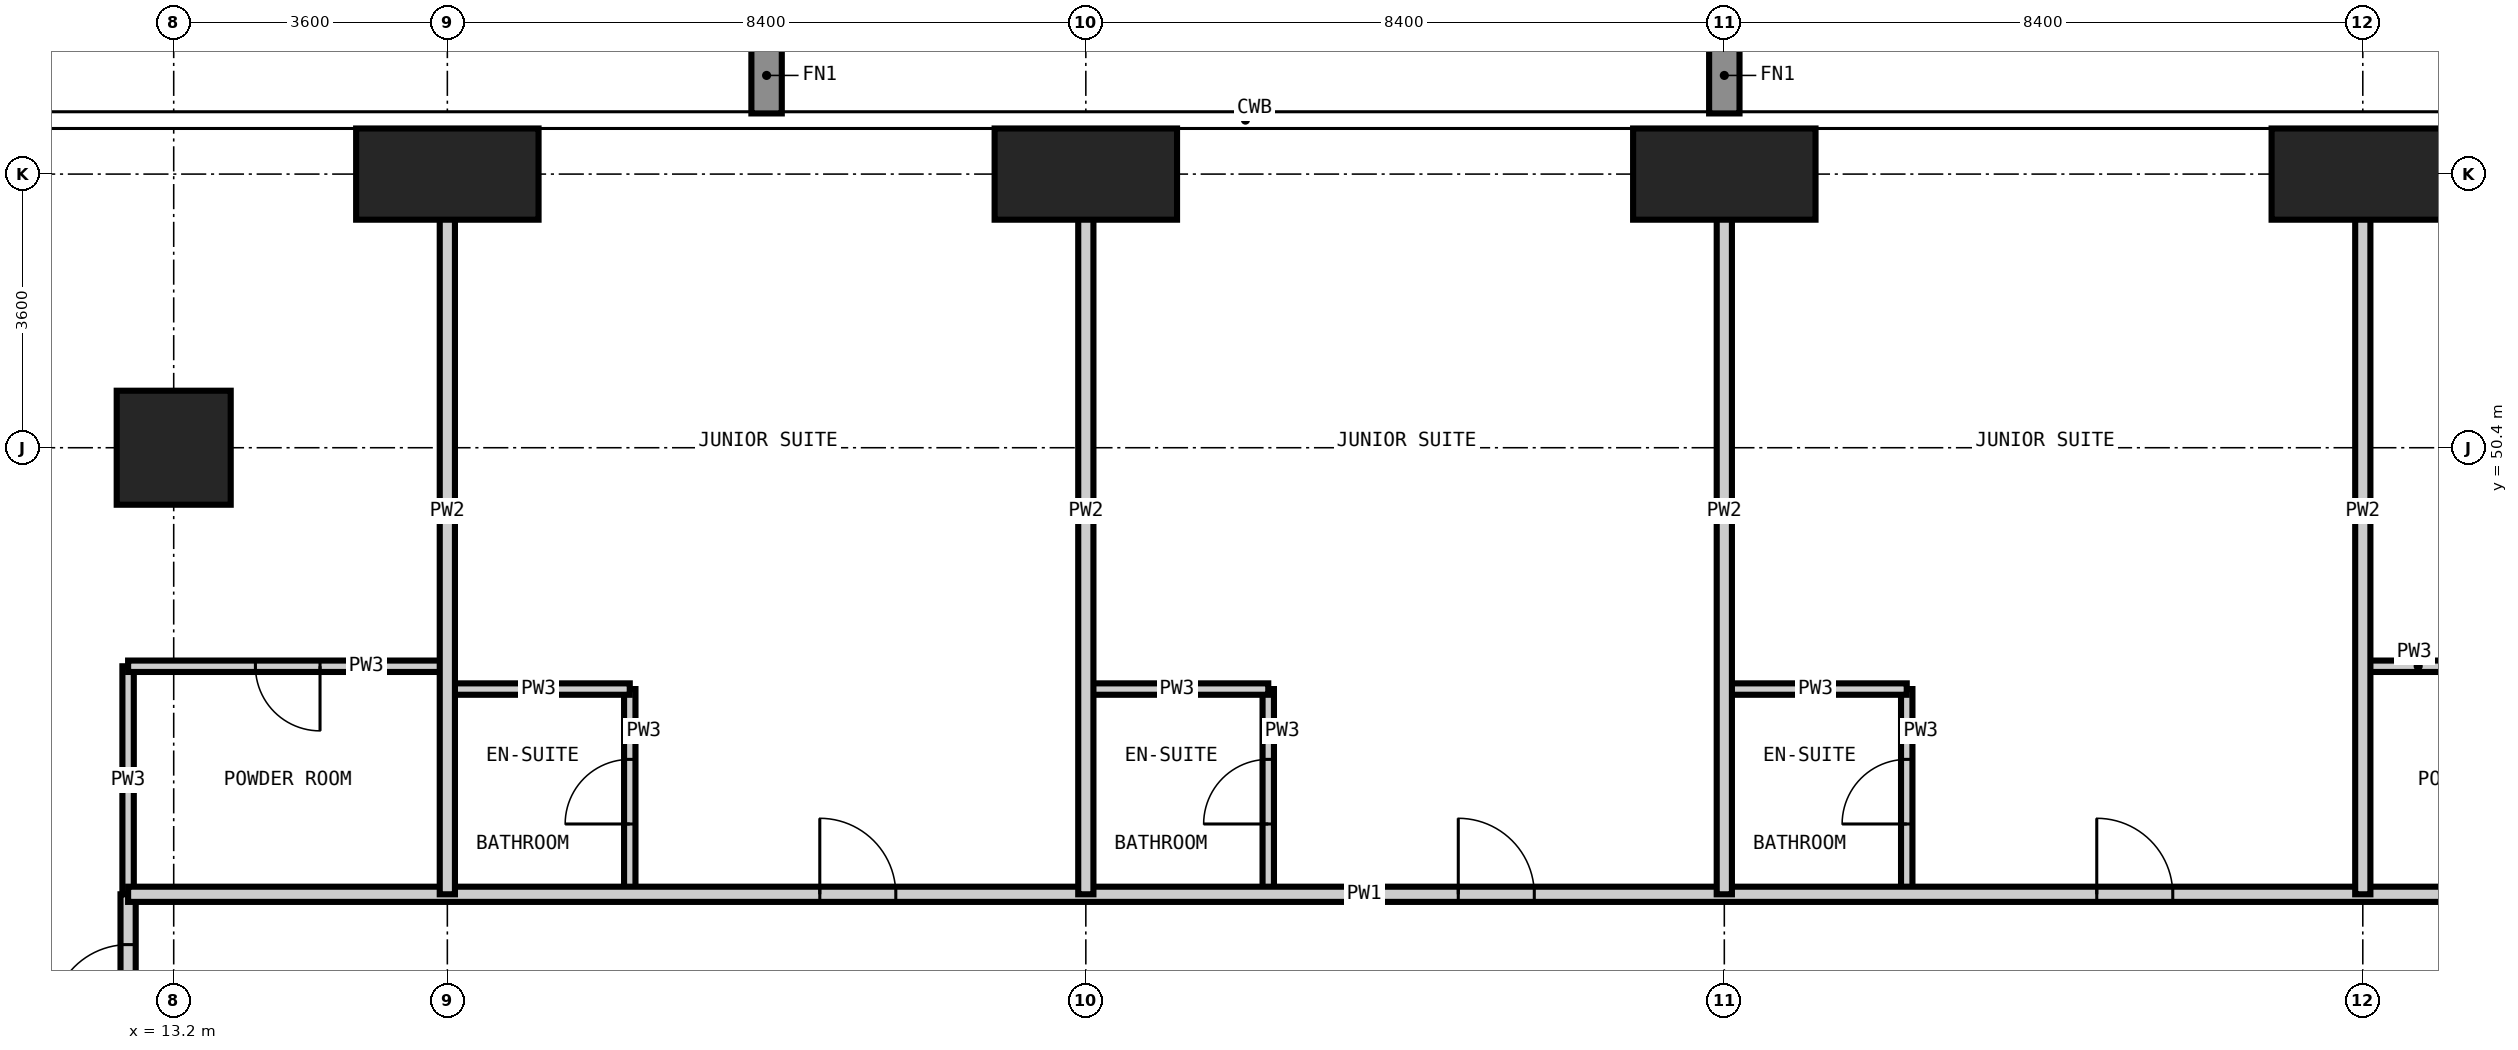
"""IFC4 building model, lengths in metres.
Left out: names, types, materials, properties, quantities, classifications, styles, units other than length and angle.
Written with IfcOpenShell. Run it as: python <this file> out.ifc"""

import sys

from ifc_helpers import new_model, si_unit, direction, frame, frame_2d, origin, origin_2d, place, context, subcontext, project, spatial, rectangle, extrude, element, fill, save


model = new_model("IFC4")
c1 = context("Model", 3, precision=1e-05, world=origin(), true_north=direction((0.0, 1.0)))
c2 = subcontext(c1, "Body", "Model", "MODEL_VIEW")
j1 = project(units=[si_unit("LENGTHUNIT", "METRE"), si_unit("PLANEANGLEUNIT", "RADIAN")], contexts=[c1])
p1 = place(None, origin())
s1 = spatial("IfcSite", under=j1, at=p1, CompositionType="ELEMENT")
p2 = place(p1, origin())
s2 = spatial("IfcBuilding", under=s1, at=p2, CompositionType="ELEMENT")
p3 = place(p2, frame((0.0, 0.0, 118.8)))
s3 = spatial("IfcBuildingStorey", under=s2, at=p3, CompositionType="ELEMENT", Elevation=118.8)
p4 = place(p3, frame((13.2, 50.4, -0.35), z_axis=(0.0, 0.0, 1.0), x_axis=(1.0, 0.0, 0.0)))
e1 = element("IfcColumn", 1, at=p4, inside=s3, PredefinedType="COLUMN", context=c2, shape_type="SweptSolid", body=[
    extrude(rectangle(XDim=1.5, YDim=1.5, at=origin_2d()), origin(), (0.0, 0.0, 1.0), 3.6),
])
for number, where, z_axis, x_axis in (
    (2, (16.8, 54.0, -0.35), (0.0, 0.0, 1.0), (1.0, 0.0, 0.0)),
    (3, (25.2, 54.0, -0.35), (0.0, 0.0, 1.0), (1.0, 0.0, 0.0)),
    (4, (33.6, 54.0, -0.35), (0.0, 0.0, 1.0), (1.0, 0.0, 0.0)),
    (5, (42.0, 54.0, -0.35), (0.0, 0.0, 1.0), (1.0, 0.0, 0.0)),
):
    element("IfcColumn", number, at=place(p3, frame(where, z_axis=z_axis, x_axis=x_axis)), inside=s3, PredefinedType="COLUMN", context=c2, shape_type="SweptSolid", body=[
        extrude(rectangle(XDim=2.4, YDim=1.2, at=origin_2d()), origin(), (0.0, 0.0, 1.0), 3.6),
    ])
p5 = place(p3, frame((12.6, 44.525, 0.0), z_axis=(0.0, 0.0, 1.0), x_axis=(0.0, 1.0, 0.0)))
e6 = element("IfcWall", 6, at=p5, inside=s3, PredefinedType="PARTITIONING", context=c2, shape_type="SweptSolid", body=[
    extrude(rectangle(XDim=3.0, YDim=0.15, at=frame_2d((1.5, 0.0))), origin(), (0.0, 0.0, 1.0), 3.25),
])
p6 = place(p3, frame((19.2, 44.525, 0.0), z_axis=(0.0, 0.0, 1.0), x_axis=(0.0, 1.0, 0.0)))
e7 = element("IfcWall", 7, at=p6, inside=s3, PredefinedType="PARTITIONING", context=c2, shape_type="SweptSolid", body=[
    extrude(rectangle(XDim=2.7, YDim=0.15, at=frame_2d((1.35, 0.0))), origin(), (0.0, 0.0, 1.0), 3.25),
])
p7 = place(p6, frame((0.925, 0.0, 0.0)))
e8 = element("IfcOpeningElement", 8, at=p7, cuts=e7, PredefinedType="OPENING", context=c2, shape_type="SweptSolid", body=[
    extrude(rectangle(XDim=0.85, YDim=2.1, at=frame_2d((0.425, 1.05))), frame((0.0, 0.085, 0.0), z_axis=(0.0, -1.0, 0.0), x_axis=(1.0, 0.0, 0.0)), (0.0, 0.0, 1.0), 0.17),
])
p8 = place(p3, frame((27.6, 44.525, 0.0), z_axis=(0.0, 0.0, 1.0), x_axis=(0.0, 1.0, 0.0)))
e9 = element("IfcWall", 9, at=p8, inside=s3, PredefinedType="PARTITIONING", context=c2, shape_type="SweptSolid", body=[
    extrude(rectangle(XDim=2.7, YDim=0.15, at=frame_2d((1.35, 0.0))), origin(), (0.0, 0.0, 1.0), 3.25),
])
p9 = place(p8, frame((0.925, 0.0, 0.0)))
e10 = element("IfcOpeningElement", 10, at=p9, cuts=e9, PredefinedType="OPENING", context=c2, shape_type="SweptSolid", body=[
    extrude(rectangle(XDim=0.85, YDim=2.1, at=frame_2d((0.425, 1.05))), frame((0.0, 0.085, 0.0), z_axis=(0.0, -1.0, 0.0), x_axis=(1.0, 0.0, 0.0)), (0.0, 0.0, 1.0), 0.17),
])
p10 = place(p3, frame((36.0, 44.525, 0.0), z_axis=(0.0, 0.0, 1.0), x_axis=(0.0, 1.0, 0.0)))
e11 = element("IfcWall", 11, at=p10, inside=s3, PredefinedType="PARTITIONING", context=c2, shape_type="SweptSolid", body=[
    extrude(rectangle(XDim=2.7, YDim=0.15, at=frame_2d((1.35, 0.0))), origin(), (0.0, 0.0, 1.0), 3.25),
])
p11 = place(p10, frame((0.925, 0.0, 0.0)))
e12 = element("IfcOpeningElement", 12, at=p11, cuts=e11, PredefinedType="OPENING", context=c2, shape_type="SweptSolid", body=[
    extrude(rectangle(XDim=0.85, YDim=2.1, at=frame_2d((0.425, 1.05))), frame((0.0, 0.085, 0.0), z_axis=(0.0, -1.0, 0.0), x_axis=(1.0, 0.0, 0.0)), (0.0, 0.0, 1.0), 0.17),
])
p12 = place(p3, frame((16.8, 47.225, 0.0), z_axis=(0.0, 0.0, 1.0), x_axis=(1.0, 0.0, 0.0)))
e13 = element("IfcWall", 13, at=p12, inside=s3, PredefinedType="PARTITIONING", context=c2, shape_type="SweptSolid", body=[
    extrude(rectangle(XDim=2.4, YDim=0.15, at=frame_2d((1.2, 0.0))), origin(), (0.0, 0.0, 1.0), 3.25),
])
p13 = place(p3, frame((25.2, 47.225, 0.0), z_axis=(0.0, 0.0, 1.0), x_axis=(1.0, 0.0, 0.0)))
e14 = element("IfcWall", 14, at=p13, inside=s3, PredefinedType="PARTITIONING", context=c2, shape_type="SweptSolid", body=[
    extrude(rectangle(XDim=2.4, YDim=0.15, at=frame_2d((1.2, 0.0))), origin(), (0.0, 0.0, 1.0), 3.25),
])
p14 = place(p3, frame((33.6, 47.225, 0.0), z_axis=(0.0, 0.0, 1.0), x_axis=(1.0, 0.0, 0.0)))
e15 = element("IfcWall", 15, at=p14, inside=s3, PredefinedType="PARTITIONING", context=c2, shape_type="SweptSolid", body=[
    extrude(rectangle(XDim=2.4, YDim=0.15, at=frame_2d((1.2, 0.0))), origin(), (0.0, 0.0, 1.0), 3.25),
])
p15 = place(p3, frame((12.6, 47.525, 0.0), z_axis=(0.0, 0.0, 1.0), x_axis=(1.0, 0.0, 0.0)))
e16 = element("IfcWall", 16, at=p15, inside=s3, PredefinedType="PARTITIONING", context=c2, shape_type="SweptSolid", body=[
    extrude(rectangle(XDim=4.2, YDim=0.15, at=frame_2d((2.1, 0.0))), origin(), (0.0, 0.0, 1.0), 3.25),
])
p16 = place(p15, frame((1.675, 0.0, 0.0)))
e17 = element("IfcOpeningElement", 17, at=p16, cuts=e16, PredefinedType="OPENING", context=c2, shape_type="SweptSolid", body=[
    extrude(rectangle(XDim=0.85, YDim=2.1, at=frame_2d((0.425, 1.05))), frame((0.0, 0.085, 0.0), z_axis=(0.0, -1.0, 0.0), x_axis=(1.0, 0.0, 0.0)), (0.0, 0.0, 1.0), 0.17),
])
p17 = place(p3, frame((42.0, 47.525, 0.0), z_axis=(0.0, 0.0, 1.0), x_axis=(1.0, 0.0, 0.0)))
e18 = element("IfcWall", 18, at=p17, inside=s3, PredefinedType="PARTITIONING", context=c2, shape_type="SweptSolid", body=[
    extrude(rectangle(XDim=3.125, YDim=0.15, at=frame_2d((1.562, 0.0))), origin(), (0.0, 0.0, 1.0), 3.25),
])
p18 = place(p17, frame((1.138, 0.0, 0.0)))
e19 = element("IfcOpeningElement", 19, at=p18, cuts=e18, PredefinedType="OPENING", context=c2, shape_type="SweptSolid", body=[
    extrude(rectangle(XDim=0.85, YDim=2.1, at=frame_2d((0.425, 1.05))), frame((0.0, 0.085, 0.0), z_axis=(0.0, -1.0, 0.0), x_axis=(1.0, 0.0, 0.0)), (0.0, 0.0, 1.0), 0.17),
])
p19 = place(p3, frame((12.6, 13.075, 0.0), z_axis=(0.0, 0.0, 1.0), x_axis=(0.0, 1.0, 0.0)))
e20 = element("IfcWall", 20, at=p19, inside=s3, PredefinedType="PARTITIONING", context=c2, shape_type="SweptSolid", body=[
    extrude(rectangle(XDim=31.45, YDim=0.2, at=frame_2d((15.725, 0.0))), origin(), (0.0, 0.0, 1.0), 3.25),
])
p20 = place(p19, frame((8.625, 0.0, 0.0)))
e21 = element("IfcOpeningElement", 21, at=p20, cuts=e20, PredefinedType="OPENING", context=c2, shape_type="SweptSolid", body=[
    extrude(rectangle(XDim=1.0, YDim=2.2, at=frame_2d((0.5, 1.1))), frame((0.0, 0.11, 0.0), z_axis=(0.0, -1.0, 0.0), x_axis=(1.0, 0.0, 0.0)), (0.0, 0.0, 1.0), 0.22),
])
p21 = place(p19, frame((17.025, 0.0, 0.0)))
e22 = element("IfcOpeningElement", 22, at=p21, cuts=e20, PredefinedType="OPENING", context=c2, shape_type="SweptSolid", body=[
    extrude(rectangle(XDim=1.0, YDim=2.2, at=frame_2d((0.5, 1.1))), frame((0.0, 0.11, 0.0), z_axis=(0.0, -1.0, 0.0), x_axis=(1.0, 0.0, 0.0)), (0.0, 0.0, 1.0), 0.22),
])
p22 = place(p19, frame((25.425, 0.0, 0.0)))
e23 = element("IfcOpeningElement", 23, at=p22, cuts=e20, PredefinedType="OPENING", context=c2, shape_type="SweptSolid", body=[
    extrude(rectangle(XDim=1.0, YDim=2.2, at=frame_2d((0.5, 1.1))), frame((0.0, 0.11, 0.0), z_axis=(0.0, -1.0, 0.0), x_axis=(1.0, 0.0, 0.0)), (0.0, 0.0, 1.0), 0.22),
])
p23 = place(p19, frame((1.363, 0.0, 0.0)))
e24 = element("IfcOpeningElement", 24, at=p23, cuts=e20, PredefinedType="OPENING", context=c2, shape_type="SweptSolid", body=[
    extrude(rectangle(XDim=1.0, YDim=2.2, at=frame_2d((0.5, 1.1))), frame((0.0, 0.11, 0.0), z_axis=(0.0, -1.0, 0.0), x_axis=(1.0, 0.0, 0.0)), (0.0, 0.0, 1.0), 0.22),
])
p24 = place(p19, frame((29.788, 0.0, 0.0)))
e25 = element("IfcOpeningElement", 25, at=p24, cuts=e20, PredefinedType="OPENING", context=c2, shape_type="SweptSolid", body=[
    extrude(rectangle(XDim=1.0, YDim=2.2, at=frame_2d((0.5, 1.1))), frame((0.0, 0.11, 0.0), z_axis=(0.0, -1.0, 0.0), x_axis=(1.0, 0.0, 0.0)), (0.0, 0.0, 1.0), 0.22),
])
p25 = place(p3, frame((12.6, 44.525, 0.0), z_axis=(0.0, 0.0, 1.0), x_axis=(1.0, 0.0, 0.0)))
e26 = element("IfcWall", 26, at=p25, inside=s3, PredefinedType="PARTITIONING", context=c2, shape_type="SweptSolid", body=[
    extrude(rectangle(XDim=32.525, YDim=0.2, at=frame_2d((16.262, 0.0))), origin(), (0.0, 0.0, 1.0), 3.25),
])
p26 = place(p25, frame((9.1, 0.0, 0.0)))
e27 = element("IfcOpeningElement", 27, at=p26, cuts=e26, PredefinedType="OPENING", context=c2, shape_type="SweptSolid", body=[
    extrude(rectangle(XDim=1.0, YDim=2.2, at=frame_2d((0.5, 1.1))), frame((0.0, 0.11, 0.0), z_axis=(0.0, -1.0, 0.0), x_axis=(1.0, 0.0, 0.0)), (0.0, 0.0, 1.0), 0.22),
])
p27 = place(p25, frame((17.5, 0.0, 0.0)))
e28 = element("IfcOpeningElement", 28, at=p27, cuts=e26, PredefinedType="OPENING", context=c2, shape_type="SweptSolid", body=[
    extrude(rectangle(XDim=1.0, YDim=2.2, at=frame_2d((0.5, 1.1))), frame((0.0, 0.11, 0.0), z_axis=(0.0, -1.0, 0.0), x_axis=(1.0, 0.0, 0.0)), (0.0, 0.0, 1.0), 0.22),
])
p28 = place(p25, frame((25.9, 0.0, 0.0)))
e29 = element("IfcOpeningElement", 29, at=p28, cuts=e26, PredefinedType="OPENING", context=c2, shape_type="SweptSolid", body=[
    extrude(rectangle(XDim=1.0, YDim=2.2, at=frame_2d((0.5, 1.1))), frame((0.0, 0.11, 0.0), z_axis=(0.0, -1.0, 0.0), x_axis=(1.0, 0.0, 0.0)), (0.0, 0.0, 1.0), 0.22),
])
for number, where, z_axis, x_axis in (
    (30, (16.8, 44.525, 0.0), (0.0, 0.0, 1.0), (0.0, 1.0, 0.0)),
    (31, (25.2, 44.525, 0.0), (0.0, 0.0, 1.0), (0.0, 1.0, 0.0)),
    (32, (33.6, 44.525, 0.0), (0.0, 0.0, 1.0), (0.0, 1.0, 0.0)),
    (33, (42.0, 44.525, 0.0), (0.0, 0.0, 1.0), (0.0, 1.0, 0.0)),
):
    element("IfcWall", number, at=place(p3, frame(where, z_axis=z_axis, x_axis=x_axis)), inside=s3, PredefinedType="PARTITIONING", context=c2, shape_type="SweptSolid", body=[
        extrude(rectangle(XDim=10.093, YDim=0.2, at=frame_2d((5.046, 0.0))), origin(), (0.0, 0.0, 1.0), 3.25),
    ])
p29 = place(p26, origin())
e34 = element("IfcDoor", 34, at=p29, inside=s3, OperationType="SINGLE_SWING_LEFT", PredefinedType="DOOR", context=c2, shape_type="SweptSolid", body=[
    extrude(rectangle(XDim=1.0, YDim=2.2, at=frame_2d((0.5, 1.1))), frame((0.0, 0.025, 0.0), z_axis=(0.0, -1.0, 0.0), x_axis=(1.0, 0.0, 0.0)), (0.0, 0.0, 1.0), 0.05),
])
fill(e27, e34)
p30 = place(p7, origin())
e35 = element("IfcDoor", 35, at=p30, inside=s3, OperationType="SINGLE_SWING_LEFT", PredefinedType="DOOR", context=c2, shape_type="SweptSolid", body=[
    extrude(rectangle(XDim=0.85, YDim=2.1, at=frame_2d((0.425, 1.05))), frame((0.0, 0.025, 0.0), z_axis=(0.0, -1.0, 0.0), x_axis=(1.0, 0.0, 0.0)), (0.0, 0.0, 1.0), 0.05),
])
fill(e8, e35)
p31 = place(p27, origin())
e36 = element("IfcDoor", 36, at=p31, inside=s3, OperationType="SINGLE_SWING_LEFT", PredefinedType="DOOR", context=c2, shape_type="SweptSolid", body=[
    extrude(rectangle(XDim=1.0, YDim=2.2, at=frame_2d((0.5, 1.1))), frame((0.0, 0.025, 0.0), z_axis=(0.0, -1.0, 0.0), x_axis=(1.0, 0.0, 0.0)), (0.0, 0.0, 1.0), 0.05),
])
fill(e28, e36)
p32 = place(p9, origin())
e37 = element("IfcDoor", 37, at=p32, inside=s3, OperationType="SINGLE_SWING_LEFT", PredefinedType="DOOR", context=c2, shape_type="SweptSolid", body=[
    extrude(rectangle(XDim=0.85, YDim=2.1, at=frame_2d((0.425, 1.05))), frame((0.0, 0.025, 0.0), z_axis=(0.0, -1.0, 0.0), x_axis=(1.0, 0.0, 0.0)), (0.0, 0.0, 1.0), 0.05),
])
fill(e10, e37)
p33 = place(p28, origin())
e38 = element("IfcDoor", 38, at=p33, inside=s3, OperationType="SINGLE_SWING_LEFT", PredefinedType="DOOR", context=c2, shape_type="SweptSolid", body=[
    extrude(rectangle(XDim=1.0, YDim=2.2, at=frame_2d((0.5, 1.1))), frame((0.0, 0.025, 0.0), z_axis=(0.0, -1.0, 0.0), x_axis=(1.0, 0.0, 0.0)), (0.0, 0.0, 1.0), 0.05),
])
fill(e29, e38)
p34 = place(p11, origin())
e39 = element("IfcDoor", 39, at=p34, inside=s3, OperationType="SINGLE_SWING_LEFT", PredefinedType="DOOR", context=c2, shape_type="SweptSolid", body=[
    extrude(rectangle(XDim=0.85, YDim=2.1, at=frame_2d((0.425, 1.05))), frame((0.0, 0.025, 0.0), z_axis=(0.0, -1.0, 0.0), x_axis=(1.0, 0.0, 0.0)), (0.0, 0.0, 1.0), 0.05),
])
fill(e12, e39)
p35 = place(p24, origin())
e40 = element("IfcDoor", 40, at=p35, inside=s3, OperationType="SINGLE_SWING_LEFT", PredefinedType="DOOR", context=c2, shape_type="SweptSolid", body=[
    extrude(rectangle(XDim=1.0, YDim=2.2, at=frame_2d((0.5, 1.1))), frame((0.0, 0.025, 0.0), z_axis=(0.0, -1.0, 0.0), x_axis=(1.0, 0.0, 0.0)), (0.0, 0.0, 1.0), 0.05),
])
fill(e25, e40)
p36 = place(p16, frame((0.85, 0.0, 0.0), z_axis=(0.0, 0.0, 1.0), x_axis=(-1.0, 0.0, 0.0)))
e41 = element("IfcDoor", 41, at=p36, inside=s3, OperationType="SINGLE_SWING_LEFT", PredefinedType="DOOR", context=c2, shape_type="SweptSolid", body=[
    extrude(rectangle(XDim=0.85, YDim=2.1, at=frame_2d((0.425, 1.05))), frame((0.0, 0.025, 0.0), z_axis=(0.0, -1.0, 0.0), x_axis=(1.0, 0.0, 0.0)), (0.0, 0.0, 1.0), 0.05),
])
fill(e17, e41)
save(model, sys.argv[1])
